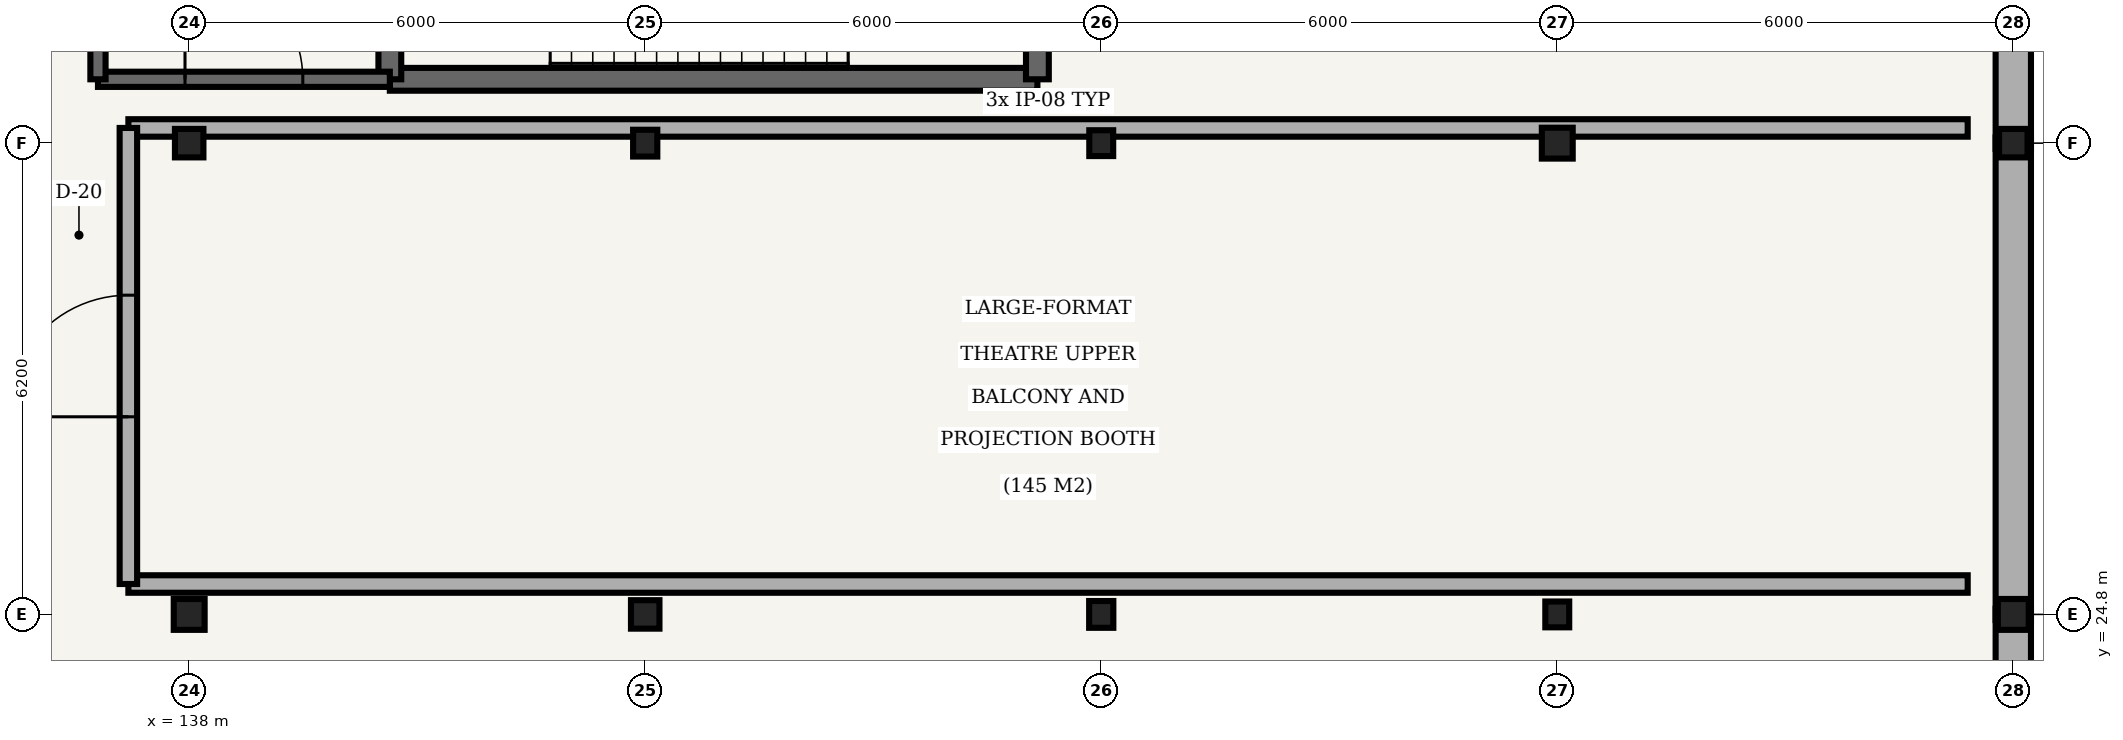
"""IFC4 building model, lengths in metres.
Left out: names, types, materials, properties, quantities, classifications, styles, units other than length and angle.
Written with IfcOpenShell. Run it as: python <this file> out.ifc"""

import sys

from ifc_helpers import new_model, si_unit, direction, frame, frame_2d, origin, origin_2d, place, context, subcontext, project, spatial, rectangle, hollow_circle, i_section, extrude, element, fill, save


model = new_model("IFC4")
c1 = context("Model", 3, precision=1e-05, world=origin(), true_north=direction((0.0, 1.0)))
c2 = subcontext(c1, "Body", "Model", "MODEL_VIEW")
j1 = project(units=[si_unit("LENGTHUNIT", "METRE"), si_unit("PLANEANGLEUNIT", "RADIAN")], contexts=[c1])
p1 = place(None, origin())
s1 = spatial("IfcSite", under=j1, at=p1, CompositionType="ELEMENT")
p2 = place(p1, origin())
s2 = spatial("IfcBuilding", under=s1, at=p2, CompositionType="ELEMENT")
p3 = place(p2, frame((0.0, 0.0, 5.4)))
s3 = spatial("IfcBuildingStorey", under=s2, at=p3, CompositionType="ELEMENT", Elevation=5.4)
p4 = place(p3, frame((138.0, 24.8, 0.0), z_axis=(0.0, 0.0, 1.0), x_axis=(1.0, 0.0, 0.0)))
e1 = element("IfcColumn", 1, at=p4, inside=s3, PredefinedType="COLUMN", context=c2, shape_type="SweptSolid", body=[
    extrude(hollow_circle(Radius=0.203, WallThickness=0.016, at=origin_2d()), origin(), (0.0, 0.0, 1.0), 5.4),
])
for number, where, z_axis, x_axis in (
    (2, (138.0, 31.0, 0.0), (0.0, 0.0, 1.0), (1.0, 0.0, 0.0)),
    (3, (144.0, 24.8, 0.0), (0.0, 0.0, 1.0), (1.0, 0.0, 0.0)),
):
    element("IfcColumn", number, at=place(p3, frame(where, z_axis=z_axis, x_axis=x_axis)), inside=s3, PredefinedType="COLUMN", context=c2, shape_type="SweptSolid", body=[
        extrude(i_section(OverallWidth=0.375, OverallDepth=0.375, WebThickness=0.017, FlangeThickness=0.027, FilletRadius=0.015, at=origin_2d()), origin(), (0.0, 0.0, 1.0), 5.4),
    ])
for number, where, z_axis, x_axis in (
    (4, (144.0, 31.0, 0.0), (0.0, 0.0, 1.0), (1.0, 0.0, 0.0)),
    (5, (150.0, 24.8, 0.0), (0.0, 0.0, 1.0), (1.0, 0.0, 0.0)),
):
    element("IfcColumn", number, at=place(p3, frame(where, z_axis=z_axis, x_axis=x_axis)), inside=s3, PredefinedType="COLUMN", context=c2, shape_type="SweptSolid", body=[
        extrude(i_section(OverallWidth=0.318, OverallDepth=0.353, WebThickness=0.023, FlangeThickness=0.038, FilletRadius=0.015, at=origin_2d()), origin(), (0.0, 0.0, 1.0), 5.4),
    ])
for number, where, z_axis, x_axis in (
    (6, (150.0, 31.0, 0.0), (0.0, 0.0, 1.0), (1.0, 0.0, 0.0)),
    (7, (156.0, 24.8, 0.0), (0.0, 0.0, 1.0), (1.0, 0.0, 0.0)),
):
    element("IfcColumn", number, at=place(p3, frame(where, z_axis=z_axis, x_axis=x_axis)), inside=s3, PredefinedType="COLUMN", context=c2, shape_type="SweptSolid", body=[
        extrude(i_section(OverallWidth=0.314, OverallDepth=0.34, WebThickness=0.019, FlangeThickness=0.031, FilletRadius=0.015, at=origin_2d()), origin(), (0.0, 0.0, 1.0), 5.4),
    ])
for number, where, z_axis, x_axis in (
    (8, (156.0, 31.0, 0.0), (0.0, 0.0, 1.0), (1.0, 0.0, 0.0)),
    (9, (162.0, 24.8, 0.0), (0.0, 0.0, 1.0), (1.0, 0.0, 0.0)),
):
    element("IfcColumn", number, at=place(p3, frame(where, z_axis=z_axis, x_axis=x_axis)), inside=s3, PredefinedType="COLUMN", context=c2, shape_type="SweptSolid", body=[
        extrude(hollow_circle(Radius=0.203, WallThickness=0.016, at=origin_2d()), origin(), (0.0, 0.0, 1.0), 5.4),
    ])
p5 = place(p3, frame((162.0, 31.0, 0.0), z_axis=(0.0, 0.0, 1.0), x_axis=(1.0, 0.0, 0.0)))
e10 = element("IfcColumn", 10, at=p5, inside=s3, PredefinedType="COLUMN", context=c2, shape_type="SweptSolid", body=[
    extrude(i_section(OverallWidth=0.375, OverallDepth=0.375, WebThickness=0.017, FlangeThickness=0.027, FilletRadius=0.015, at=origin_2d()), origin(), (0.0, 0.0, 1.0), 5.4),
])
p6 = place(p3, frame((162.0, 18.525, 0.0), z_axis=(0.0, 0.0, 1.0), x_axis=(0.0, 1.0, 0.0)))
e11 = element("IfcWall", 11, at=p6, inside=s3, PredefinedType="SOLIDWALL", context=c2, shape_type="SweptSolid", body=[
    extrude(rectangle(XDim=6.35, YDim=0.465, at=frame_2d((3.175, 0.0))), origin(), (0.0, 0.0, 1.0), 4.44),
])
for number, where, z_axis, x_axis in (
    (12, (162.0, 24.725, 0.0), (0.0, 0.0, 1.0), (0.0, 1.0, 0.0)),
    (13, (162.0, 30.925, 0.0), (0.0, 0.0, 1.0), (0.0, 1.0, 0.0)),
):
    element("IfcWall", number, at=place(p3, frame(where, z_axis=z_axis, x_axis=x_axis)), inside=s3, PredefinedType="SOLIDWALL", context=c2, shape_type="SweptSolid", body=[
        extrude(rectangle(XDim=6.35, YDim=0.465, at=frame_2d((3.175, 0.0))), origin(), (0.0, 0.0, 1.0), 4.44),
    ])
p7 = place(p3, frame((140.64, 31.84, 0.0), z_axis=(0.0, 0.0, 1.0), x_axis=(1.0, 0.0, 0.0)))
e14 = element("IfcWall", 14, at=p7, inside=s3, PredefinedType="SHEAR", context=c2, shape_type="SweptSolid", body=[
    extrude(rectangle(XDim=8.52, YDim=0.3, at=frame_2d((4.26, 0.0))), origin(), (0.0, 0.0, 1.0), 5.15),
])
p8 = place(p3, frame((140.64, 36.21, 0.0), z_axis=(0.0, 0.0, 1.0), x_axis=(0.0, -1.0, 0.0)))
e15 = element("IfcWall", 15, at=p8, inside=s3, PredefinedType="SHEAR", context=c2, shape_type="SweptSolid", body=[
    extrude(rectangle(XDim=4.37, YDim=0.3, at=frame_2d((2.185, 0.0))), origin(), (0.0, 0.0, 1.0), 5.15),
])
p9 = place(p8, frame((1.51, 0.0, 0.0)))
e16 = element("IfcOpeningElement", 16, at=p9, cuts=e15, PredefinedType="OPENING", context=c2, shape_type="SweptSolid", body=[
    extrude(rectangle(XDim=1.35, YDim=2.2, at=frame_2d((0.675, 1.1))), frame((0.0, 0.16, 0.0), z_axis=(0.0, -1.0, 0.0), x_axis=(1.0, 0.0, 0.0)), (0.0, 0.0, 1.0), 0.32),
])
p10 = place(p3, frame((149.16, 31.84, 0.0), z_axis=(0.0, 0.0, 1.0), x_axis=(0.0, 1.0, 0.0)))
e17 = element("IfcWall", 17, at=p10, inside=s3, PredefinedType="SHEAR", context=c2, shape_type="SweptSolid", body=[
    extrude(rectangle(XDim=4.37, YDim=0.3, at=frame_2d((2.185, 0.0))), origin(), (0.0, 0.0, 1.0), 5.15),
])
p11 = place(p3, frame((136.8, 31.84, 0.0), z_axis=(0.0, 0.0, 1.0), x_axis=(1.0, 0.0, 0.0)))
e18 = element("IfcWall", 18, at=p11, inside=s3, PredefinedType="SHEAR", context=c2, shape_type="SweptSolid", body=[
    extrude(rectangle(XDim=3.84, YDim=0.2, at=frame_2d((1.92, 0.0))), origin(), (0.0, 0.0, 1.0), 5.15),
])
p12 = place(p11, frame((1.145, 0.0, 0.0)))
e19 = element("IfcOpeningElement", 19, at=p12, cuts=e18, PredefinedType="OPENING", context=c2, shape_type="SweptSolid", body=[
    extrude(rectangle(XDim=1.55, YDim=2.2, at=frame_2d((0.775, 1.1))), frame((0.0, 0.11, 0.0), z_axis=(0.0, -1.0, 0.0), x_axis=(1.0, 0.0, 0.0)), (0.0, 0.0, 1.0), 0.22),
])
p13 = place(p3, frame((136.8, 36.21, 0.0), z_axis=(0.0, 0.0, 1.0), x_axis=(0.0, -1.0, 0.0)))
e20 = element("IfcWall", 20, at=p13, inside=s3, PredefinedType="SHEAR", context=c2, shape_type="SweptSolid", body=[
    extrude(rectangle(XDim=4.37, YDim=0.2, at=frame_2d((2.185, 0.0))), origin(), (0.0, 0.0, 1.0), 5.15),
])
for number, where, z_axis, x_axis in (
    (21, (137.2, 31.2, 0.0), (0.0, 0.0, 1.0), (1.0, 0.0, 0.0)),
    (22, (161.4, 25.2, 0.0), (0.0, 0.0, 1.0), (-1.0, 0.0, 0.0)),
):
    element("IfcWall", number, at=place(p3, frame(where, z_axis=z_axis, x_axis=x_axis)), inside=s3, PredefinedType="PARTITIONING", context=c2, shape_type="SweptSolid", body=[
        extrude(rectangle(XDim=24.2, YDim=0.23, at=frame_2d((12.1, 0.0))), origin(), (0.0, 0.0, 1.0), 4.35),
    ])
p14 = place(p3, frame((137.2, 25.2, 0.0), z_axis=(0.0, 0.0, 1.0), x_axis=(0.0, 1.0, 0.0)))
e23 = element("IfcWall", 23, at=p14, inside=s3, PredefinedType="PARTITIONING", context=c2, shape_type="SweptSolid", body=[
    extrude(rectangle(XDim=6.0, YDim=0.23, at=frame_2d((3.0, 0.0))), origin(), (0.0, 0.0, 1.0), 4.35),
])
p15 = place(p14, frame((2.2, 0.0, 0.0)))
e24 = element("IfcOpeningElement", 24, at=p15, cuts=e23, PredefinedType="OPENING", context=c2, shape_type="SweptSolid", body=[
    extrude(rectangle(XDim=1.6, YDim=2.25, at=frame_2d((0.8, 1.125))), frame((0.0, 0.125, 0.0), z_axis=(0.0, -1.0, 0.0), x_axis=(1.0, 0.0, 0.0)), (0.0, 0.0, 1.0), 0.25),
])
p16 = place(p12, origin())
e25 = element("IfcDoor", 25, at=p16, inside=s3, OperationType="SINGLE_SWING_LEFT", PredefinedType="DOOR", context=c2, shape_type="SweptSolid", body=[
    extrude(rectangle(XDim=1.55, YDim=2.2, at=frame_2d((0.775, 1.1))), frame((0.0, 0.025, 0.0), z_axis=(0.0, -1.0, 0.0), x_axis=(1.0, 0.0, 0.0)), (0.0, 0.0, 1.0), 0.05),
])
fill(e19, e25)
p17 = place(p15, origin())
e26 = element("IfcDoor", 26, at=p17, inside=s3, OperationType="DOUBLE_DOOR_SINGLE_SWING", PredefinedType="DOOR", context=c2, shape_type="SweptSolid", body=[
    extrude(rectangle(XDim=1.6, YDim=2.25, at=frame_2d((0.8, 1.125))), frame((0.0, 0.025, 0.0), z_axis=(0.0, -1.0, 0.0), x_axis=(1.0, 0.0, 0.0)), (0.0, 0.0, 1.0), 0.05),
])
fill(e24, e26)
save(model, sys.argv[1])
